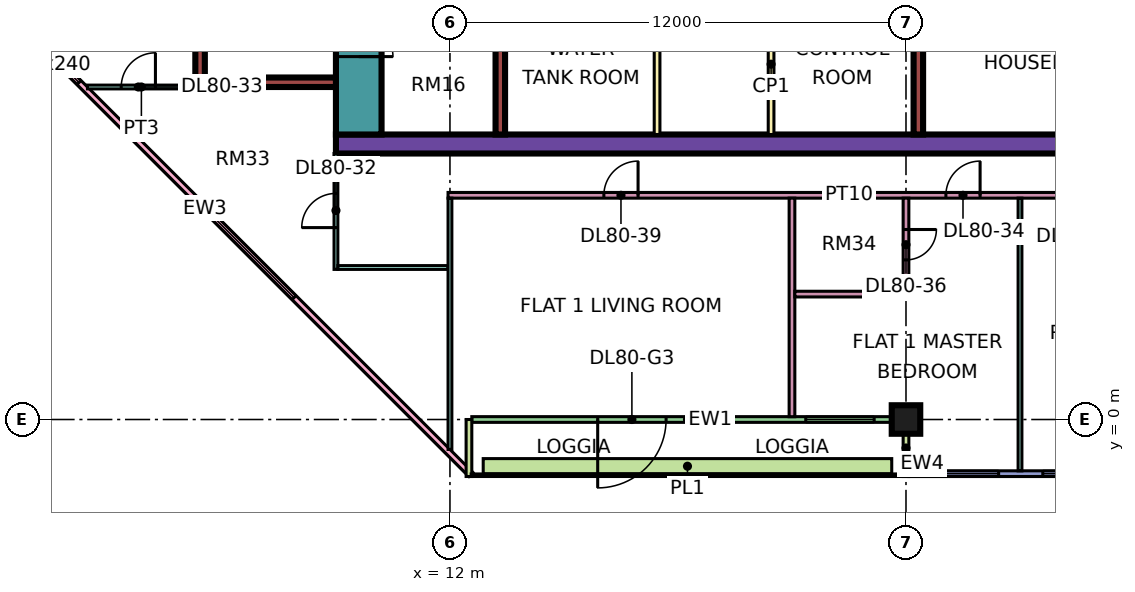
"""IFC4 building model, lengths in metres.
Left out: names, types, materials, properties, quantities, classifications, styles, units other than length and angle.
Written with IfcOpenShell. Run it as: python <this file> out.ifc"""

import sys

from ifc_helpers import new_model, si_unit, direction, frame, frame_2d, origin, origin_2d, place, context, subcontext, project, spatial, rectangle, extrude, element, fill, save


model = new_model("IFC4")
c1 = context("Model", 3, precision=1e-05, world=origin(), true_north=direction((0.0, 1.0)))
c2 = subcontext(c1, "Body", "Model", "MODEL_VIEW")
j1 = project(units=[si_unit("LENGTHUNIT", "METRE"), si_unit("PLANEANGLEUNIT", "RADIAN")], contexts=[c1])
p1 = place(None, origin())
s1 = spatial("IfcSite", under=j1, at=p1, CompositionType="ELEMENT")
p2 = place(p1, origin())
s2 = spatial("IfcBuilding", under=s1, at=p2, CompositionType="ELEMENT")
p3 = place(p2, frame((0.0, 0.0, 346.4)))
s3 = spatial("IfcBuildingStorey", under=s2, at=p3, CompositionType="ELEMENT", Elevation=346.4)
p4 = place(p3, frame((24.0, 0.0, 0.0), z_axis=(0.0, 0.0, 1.0), x_axis=(1.0, 0.0, 0.0)))
e1 = element("IfcColumn", 1, at=p4, inside=s3, PredefinedType="COLUMN", context=c2, shape_type="SweptSolid", body=[
    extrude(rectangle(XDim=0.75, YDim=0.75, at=origin_2d()), origin(), (0.0, 0.0, 1.0), 3.75),
])
p5 = place(p3, frame((9.0, 7.25, 0.0), z_axis=(0.0, 0.0, 1.0), x_axis=(1.0, 0.0, 0.0)))
e2 = element("IfcWall", 2, at=p5, inside=s3, PredefinedType="SHEAR", context=c2, shape_type="SweptSolid", body=[
    extrude(rectangle(XDim=25.0, YDim=0.5, at=frame_2d((12.5, 0.0))), origin(), (0.0, 0.0, 1.0), 3.75),
])
p6 = place(p3, frame((9.6, 7.5, 0.0), z_axis=(0.0, 0.0, 1.0), x_axis=(0.0, 1.0, 0.0)))
e3 = element("IfcWall", 3, at=p6, inside=s3, PredefinedType="SHEAR", context=c2, shape_type="SweptSolid", body=[
    extrude(rectangle(XDim=12.0, YDim=1.2, at=frame_2d((6.0, 0.0))), origin(), (0.0, 0.0, 1.0), 3.75),
])
p7 = place(p6, frame((4.375, 0.0, 0.0)))
e4 = element("IfcOpeningElement", 4, at=p7, cuts=e3, PredefinedType="OPENING", context=c2, shape_type="SweptSolid", body=[
    extrude(rectangle(XDim=1.1, YDim=2.2, at=frame_2d((0.55, 1.1))), frame((0.0, 0.61, 0.0), z_axis=(0.0, -1.0, 0.0), x_axis=(1.0, 0.0, 0.0)), (0.0, 0.0, 1.0), 1.22),
])
p8 = place(p6, frame((6.875, 0.0, 0.0)))
e5 = element("IfcOpeningElement", 5, at=p8, cuts=e3, PredefinedType="OPENING", context=c2, shape_type="SweptSolid", body=[
    extrude(rectangle(XDim=1.1, YDim=2.2, at=frame_2d((0.55, 1.1))), frame((0.0, 0.61, 0.0), z_axis=(0.0, -1.0, 0.0), x_axis=(1.0, 0.0, 0.0)), (0.0, 0.0, 1.0), 1.22),
])
p9 = place(p6, frame((9.85, 0.0, 0.0)))
e6 = element("IfcOpeningElement", 6, at=p9, cuts=e3, PredefinedType="OPENING", context=c2, shape_type="SweptSolid", body=[
    extrude(rectangle(XDim=1.1, YDim=2.2, at=frame_2d((0.55, 1.1))), frame((0.0, 0.61, 0.0), z_axis=(0.0, -1.0, 0.0), x_axis=(1.0, 0.0, 0.0)), (0.0, 0.0, 1.0), 1.22),
])
p10 = place(p6, frame((2.05, 0.0, 0.0)))
e7 = element("IfcOpeningElement", 7, at=p10, cuts=e3, PredefinedType="OPENING", context=c2, shape_type="SweptSolid", body=[
    extrude(rectangle(XDim=0.9, YDim=2.1, at=frame_2d((0.45, 1.05))), frame((0.0, 0.61, 0.0), z_axis=(0.0, -1.0, 0.0), x_axis=(1.0, 0.0, 0.0)), (0.0, 0.0, 1.0), 1.22),
])
p11 = place(p3, frame((13.325, 7.5, 0.0), z_axis=(0.0, 0.0, 1.0), x_axis=(0.0, 1.0, 0.0)))
e8 = element("IfcWall", 8, at=p11, inside=s3, PredefinedType="SHEAR", context=c2, shape_type="SweptSolid", body=[
    extrude(rectangle(XDim=12.0, YDim=0.25, at=frame_2d((6.0, 0.0))), origin(), (0.0, 0.0, 1.0), 3.75),
])
for number, where, z_axis, x_axis in (
    (9, (24.325, 7.5, 0.0), (0.0, 0.0, 1.0), (0.0, 1.0, 0.0)),
    (10, (5.3, 8.875, 0.0), (0.0, 0.0, 1.0), (1.0, 0.0, 0.0)),
):
    element("IfcWall", number, at=place(p3, frame(where, z_axis=z_axis, x_axis=x_axis)), inside=s3, PredefinedType="SHEAR", context=c2, shape_type="SweptSolid", body=[
        extrude(rectangle(XDim=3.7, YDim=0.25, at=frame_2d((1.85, 0.0))), origin(), (0.0, 0.0, 1.0), 3.75),
    ])
p12 = place(p3, frame((5.425, 9.0, 0.0), z_axis=(0.0, 0.0, 1.0), x_axis=(0.0, 1.0, 0.0)))
e11 = element("IfcWall", 11, at=p12, inside=s3, PredefinedType="SHEAR", context=c2, shape_type="SweptSolid", body=[
    extrude(rectangle(XDim=4.0, YDim=0.25, at=frame_2d((2.0, 0.0))), origin(), (0.0, 0.0, 1.0), 3.75),
])
p13 = place(p3, frame((-1.447, 12.553, 0.0), z_axis=(0.0, 0.0, 1.0), x_axis=(0.707106781187, -0.707106781187, 0.0)))
e12 = element("IfcWall", 12, at=p13, inside=s3, PredefinedType="SOLIDWALL", context=c2, shape_type="SweptSolid", body=[
    extrude(rectangle(XDim=19.799, YDim=0.15, at=frame_2d((9.899, 0.0))), origin(), (0.0, 0.0, 1.0), 3.35),
])
p14 = place(p13, frame((2.212, 0.0, 0.45)))
e13 = element("IfcOpeningElement", 13, at=p14, cuts=e12, PredefinedType="OPENING", context=c2, shape_type="SweptSolid", body=[
    extrude(rectangle(XDim=3.0, YDim=2.4, at=frame_2d((1.5, 1.2))), frame((0.0, 0.085, 0.0), z_axis=(0.0, -1.0, 0.0), x_axis=(1.0, 0.0, 0.0)), (0.0, 0.0, 1.0), 0.17),
])
p15 = place(p13, frame((10.216, 0.0, 0.45)))
e14 = element("IfcOpeningElement", 14, at=p15, cuts=e12, PredefinedType="OPENING", context=c2, shape_type="SweptSolid", body=[
    extrude(rectangle(XDim=3.0, YDim=2.4, at=frame_2d((1.5, 1.2))), frame((0.0, 0.085, 0.0), z_axis=(0.0, -1.0, 0.0), x_axis=(1.0, 0.0, 0.0)), (0.0, 0.0, 1.0), 0.17),
])
p16 = place(p3, frame((12.575, 0.0, 0.0), z_axis=(0.0, 0.0, 1.0), x_axis=(1.0, 0.0, 0.0)))
e15 = element("IfcWall", 15, at=p16, inside=s3, PredefinedType="SOLIDWALL", context=c2, shape_type="SweptSolid", body=[
    extrude(rectangle(XDim=11.35, YDim=0.15, at=frame_2d((5.675, 0.0))), origin(), (0.0, 0.0, 1.0), 3.35),
])
p17 = place(p16, frame((3.312, 0.0, 0.0)))
e16 = element("IfcOpeningElement", 16, at=p17, cuts=e15, PredefinedType="OPENING", context=c2, shape_type="SweptSolid", body=[
    extrude(rectangle(XDim=1.8, YDim=2.4, at=frame_2d((0.9, 1.2))), frame((0.0, 0.085, 0.0), z_axis=(0.0, -1.0, 0.0), x_axis=(1.0, 0.0, 0.0)), (0.0, 0.0, 1.0), 0.17),
])
p18 = place(p16, frame((8.788, 0.0, 0.45)))
e17 = element("IfcOpeningElement", 17, at=p18, cuts=e15, PredefinedType="OPENING", context=c2, shape_type="SweptSolid", body=[
    extrude(rectangle(XDim=1.8, YDim=2.4, at=frame_2d((0.9, 1.2))), frame((0.0, 0.085, 0.0), z_axis=(0.0, -1.0, 0.0), x_axis=(1.0, 0.0, 0.0)), (0.0, 0.0, 1.0), 0.17),
])
for number, where, z_axis, x_axis in (
    (18, (12.5, -1.5, 0.0), (0.0, 0.0, 1.0), (0.0, 1.0, 0.0)),
    (19, (24.0, -1.5, 0.0), (0.0, 0.0, 1.0), (0.0, 1.0, 0.0)),
):
    element("IfcWall", number, at=place(p3, frame(where, z_axis=z_axis, x_axis=x_axis)), inside=s3, PredefinedType="SOLIDWALL", context=c2, shape_type="SweptSolid", body=[
        extrude(rectangle(XDim=1.5, YDim=0.15, at=frame_2d((0.75, 0.0))), origin(), (0.0, 0.0, 1.0), 3.35),
    ])
p19 = place(p3, frame((24.075, -1.425, 0.0), z_axis=(0.0, 0.0, 1.0), x_axis=(1.0, 0.0, 0.0)))
e20 = element("IfcWall", 20, at=p19, inside=s3, PredefinedType="SOLIDWALL", context=c2, shape_type="SweptSolid", body=[
    extrude(rectangle(XDim=11.85, YDim=0.15, at=frame_2d((5.925, 0.0))), origin(), (0.0, 0.0, 1.0), 3.35),
])
p20 = place(p19, frame((0.562, 0.0, 0.45)))
e21 = element("IfcOpeningElement", 21, at=p20, cuts=e20, PredefinedType="OPENING", context=c2, shape_type="SweptSolid", body=[
    extrude(rectangle(XDim=1.8, YDim=2.4, at=frame_2d((0.9, 1.2))), frame((0.0, 0.085, 0.0), z_axis=(0.0, -1.0, 0.0), x_axis=(1.0, 0.0, 0.0)), (0.0, 0.0, 1.0), 0.17),
])
p21 = place(p19, frame((3.525, 0.0, 0.45)))
e22 = element("IfcOpeningElement", 22, at=p21, cuts=e20, PredefinedType="OPENING", context=c2, shape_type="SweptSolid", body=[
    extrude(rectangle(XDim=1.8, YDim=2.4, at=frame_2d((0.9, 1.2))), frame((0.0, 0.085, 0.0), z_axis=(0.0, -1.0, 0.0), x_axis=(1.0, 0.0, 0.0)), (0.0, 0.0, 1.0), 0.17),
])
p22 = place(p19, frame((6.525, 0.0, 0.45)))
e23 = element("IfcOpeningElement", 23, at=p22, cuts=e20, PredefinedType="OPENING", context=c2, shape_type="SweptSolid", body=[
    extrude(rectangle(XDim=1.8, YDim=2.4, at=frame_2d((0.9, 1.2))), frame((0.0, 0.085, 0.0), z_axis=(0.0, -1.0, 0.0), x_axis=(1.0, 0.0, 0.0)), (0.0, 0.0, 1.0), 0.17),
])
p23 = place(p19, frame((9.488, 0.0, 0.45)))
e24 = element("IfcOpeningElement", 24, at=p23, cuts=e20, PredefinedType="OPENING", context=c2, shape_type="SweptSolid", body=[
    extrude(rectangle(XDim=1.8, YDim=2.4, at=frame_2d((0.9, 1.2))), frame((0.0, 0.085, 0.0), z_axis=(0.0, -1.0, 0.0), x_axis=(1.0, 0.0, 0.0)), (0.0, 0.0, 1.0), 0.17),
])
p24 = place(p3, frame((12.875, -1.229, 0.0), z_axis=(0.0, 0.0, 1.0), x_axis=(1.0, 0.0, 0.0)))
e25 = element("IfcWall", 25, at=p24, inside=s3, PredefinedType="SOLIDWALL", context=c2, shape_type="SweptSolid", body=[
    extrude(rectangle(XDim=10.75, YDim=0.4, at=frame_2d((5.375, 0.0))), origin(), (0.0, 0.0, 1.0), 0.7),
])
for number, where, z_axis, x_axis in (
    (26, (17.45, 7.5, 0.0), (0.0, 0.0, 1.0), (0.0, 1.0, 0.0)),
    (27, (20.45, 7.5, 0.0), (0.0, 0.0, 1.0), (0.0, 1.0, 0.0)),
):
    element("IfcWall", number, at=place(p3, frame(where, z_axis=z_axis, x_axis=x_axis)), inside=s3, PredefinedType="PARTITIONING", context=c2, shape_type="SweptSolid", body=[
        extrude(rectangle(XDim=3.7, YDim=0.15, at=frame_2d((1.85, 0.0))), origin(), (0.0, 0.0, 1.0), 3.35),
    ])
p25 = place(p3, frame((2.461, 8.75, 0.0), z_axis=(0.0, 0.0, 1.0), x_axis=(1.0, 0.0, 0.0)))
e28 = element("IfcWall", 28, at=p25, inside=s3, PredefinedType="PARTITIONING", context=c2, shape_type="SweptSolid", body=[
    extrude(rectangle(XDim=2.839, YDim=0.1, at=frame_2d((1.419, 0.0))), origin(), (0.0, 0.0, 1.0), 3.35),
])
p26 = place(p25, frame((0.889, 0.0, 0.0)))
e29 = element("IfcOpeningElement", 29, at=p26, cuts=e28, PredefinedType="OPENING", context=c2, shape_type="SweptSolid", body=[
    extrude(rectangle(XDim=0.9, YDim=2.1, at=frame_2d((0.45, 1.05))), frame((0.0, 0.06, 0.0), z_axis=(0.0, -1.0, 0.0), x_axis=(1.0, 0.0, 0.0)), (0.0, 0.0, 1.0), 0.12),
])
p27 = place(p3, frame((9.0, 3.95, 0.0), z_axis=(0.0, 0.0, 1.0), x_axis=(0.0, 1.0, 0.0)))
e30 = element("IfcWall", 30, at=p27, inside=s3, PredefinedType="PARTITIONING", context=c2, shape_type="SweptSolid", body=[
    extrude(rectangle(XDim=3.05, YDim=0.1, at=frame_2d((1.525, 0.0))), origin(), (0.0, 0.0, 1.0), 3.35),
])
p28 = place(p27, frame((1.1, 0.0, 0.0)))
e31 = element("IfcOpeningElement", 31, at=p28, cuts=e30, PredefinedType="OPENING", context=c2, shape_type="SweptSolid", body=[
    extrude(rectangle(XDim=0.9, YDim=2.1, at=frame_2d((0.45, 1.05))), frame((0.0, 0.06, 0.0), z_axis=(0.0, -1.0, 0.0), x_axis=(1.0, 0.0, 0.0)), (0.0, 0.0, 1.0), 0.12),
])
p29 = place(p3, frame((9.05, 4.0, 0.0), z_axis=(0.0, 0.0, 1.0), x_axis=(1.0, 0.0, 0.0)))
e32 = element("IfcWall", 32, at=p29, inside=s3, PredefinedType="PARTITIONING", context=c2, shape_type="SweptSolid", body=[
    extrude(rectangle(XDim=2.9, YDim=0.1, at=frame_2d((1.45, 0.0))), origin(), (0.0, 0.0, 1.0), 3.35),
])
p30 = place(p3, frame((11.95, 5.9, 0.0), z_axis=(0.0, 0.0, 1.0), x_axis=(1.0, 0.0, 0.0)))
e33 = element("IfcWall", 33, at=p30, inside=s3, PredefinedType="PARTITIONING", context=c2, shape_type="SweptSolid", body=[
    extrude(rectangle(XDim=21.1, YDim=0.15, at=frame_2d((10.55, 0.0))), origin(), (0.0, 0.0, 1.0), 3.35),
])
p31 = place(p30, frame((16.1, 0.0, 0.0)))
e34 = element("IfcOpeningElement", 34, at=p31, cuts=e33, PredefinedType="OPENING", context=c2, shape_type="SweptSolid", body=[
    extrude(rectangle(XDim=0.9, YDim=2.1, at=frame_2d((0.45, 1.05))), frame((0.0, 0.085, 0.0), z_axis=(0.0, -1.0, 0.0), x_axis=(1.0, 0.0, 0.0)), (0.0, 0.0, 1.0), 0.17),
])
p32 = place(p30, frame((13.1, 0.0, 0.0)))
e35 = element("IfcOpeningElement", 35, at=p32, cuts=e33, PredefinedType="OPENING", context=c2, shape_type="SweptSolid", body=[
    extrude(rectangle(XDim=0.9, YDim=2.1, at=frame_2d((0.45, 1.05))), frame((0.0, 0.085, 0.0), z_axis=(0.0, -1.0, 0.0), x_axis=(1.0, 0.0, 0.0)), (0.0, 0.0, 1.0), 0.17),
])
p33 = place(p30, frame((4.1, 0.0, 0.0)))
e36 = element("IfcOpeningElement", 36, at=p33, cuts=e33, PredefinedType="OPENING", context=c2, shape_type="SweptSolid", body=[
    extrude(rectangle(XDim=0.9, YDim=2.1, at=frame_2d((0.45, 1.05))), frame((0.0, 0.085, 0.0), z_axis=(0.0, -1.0, 0.0), x_axis=(1.0, 0.0, 0.0)), (0.0, 0.0, 1.0), 0.17),
])
p34 = place(p3, frame((12.0, -0.788, 0.0), z_axis=(0.0, 0.0, 1.0), x_axis=(0.0, 1.0, 0.0)))
e37 = element("IfcWall", 37, at=p34, inside=s3, PredefinedType="PARTITIONING", context=c2, shape_type="SweptSolid", body=[
    extrude(rectangle(XDim=6.613, YDim=0.1, at=frame_2d((3.306, 0.0))), origin(), (0.0, 0.0, 1.0), 3.35),
])
p35 = place(p3, frame((21.0, 0.074, 0.0), z_axis=(0.0, 0.0, 1.0), x_axis=(0.0, 1.0, 0.0)))
e38 = element("IfcWall", 38, at=p35, inside=s3, PredefinedType="PARTITIONING", context=c2, shape_type="SweptSolid", body=[
    extrude(rectangle(XDim=5.751, YDim=0.15, at=frame_2d((2.875, 0.0))), origin(), (0.0, 0.0, 1.0), 3.35),
])
p36 = place(p3, frame((21.075, 3.3, 0.0), z_axis=(0.0, 0.0, 1.0), x_axis=(1.0, 0.0, 0.0)))
e39 = element("IfcWall", 39, at=p36, inside=s3, PredefinedType="PARTITIONING", context=c2, shape_type="SweptSolid", body=[
    extrude(rectangle(XDim=3.0, YDim=0.15, at=frame_2d((1.5, 0.0))), origin(), (0.0, 0.0, 1.0), 3.35),
])
p37 = place(p3, frame((24.0, 3.375, 0.0), z_axis=(0.0, 0.0, 1.0), x_axis=(0.0, 1.0, 0.0)))
e40 = element("IfcWall", 40, at=p37, inside=s3, PredefinedType="PARTITIONING", context=c2, shape_type="SweptSolid", body=[
    extrude(rectangle(XDim=2.45, YDim=0.15, at=frame_2d((1.225, 0.0))), origin(), (0.0, 0.0, 1.0), 3.35),
])
p38 = place(p37, frame((0.825, 0.0, 0.0)))
e41 = element("IfcOpeningElement", 41, at=p38, cuts=e40, PredefinedType="OPENING", context=c2, shape_type="SweptSolid", body=[
    extrude(rectangle(XDim=0.8, YDim=2.1, at=frame_2d((0.4, 1.05))), frame((0.0, 0.085, 0.0), z_axis=(0.0, -1.0, 0.0), x_axis=(1.0, 0.0, 0.0)), (0.0, 0.0, 1.0), 0.17),
])
p39 = place(p3, frame((27.0, -1.351, 0.0), z_axis=(0.0, 0.0, 1.0), x_axis=(0.0, 1.0, 0.0)))
e42 = element("IfcWall", 42, at=p39, inside=s3, PredefinedType="PARTITIONING", context=c2, shape_type="SweptSolid", body=[
    extrude(rectangle(XDim=7.176, YDim=0.1, at=frame_2d((3.588, 0.0))), origin(), (0.0, 0.0, 1.0), 3.35),
])
p40 = place(p14, origin())
e43 = element("IfcWindow", 43, at=p40, inside=s3, PartitioningType="SINGLE_PANEL", PredefinedType="WINDOW", context=c2, shape_type="SweptSolid", body=[
    extrude(rectangle(XDim=3.0, YDim=2.4, at=frame_2d((1.5, 1.2))), frame((0.0, 0.03, 0.0), z_axis=(0.0, -1.0, 0.0), x_axis=(1.0, 0.0, 0.0)), (0.0, 0.0, 1.0), 0.06),
])
fill(e13, e43)
p41 = place(p15, origin())
e44 = element("IfcWindow", 44, at=p41, inside=s3, PartitioningType="SINGLE_PANEL", PredefinedType="WINDOW", context=c2, shape_type="SweptSolid", body=[
    extrude(rectangle(XDim=3.0, YDim=2.4, at=frame_2d((1.5, 1.2))), frame((0.0, 0.03, 0.0), z_axis=(0.0, -1.0, 0.0), x_axis=(1.0, 0.0, 0.0)), (0.0, 0.0, 1.0), 0.06),
])
fill(e14, e44)
p42 = place(p17, frame((1.8, 0.0, 0.0), z_axis=(0.0, 0.0, 1.0), x_axis=(-1.0, 0.0, 0.0)))
e45 = element("IfcDoor", 45, at=p42, inside=s3, OperationType="DOUBLE_DOOR_SINGLE_SWING", PredefinedType="DOOR", context=c2, shape_type="SweptSolid", body=[
    extrude(rectangle(XDim=1.8, YDim=2.4, at=frame_2d((0.9, 1.2))), frame((0.0, 0.025, 0.0), z_axis=(0.0, -1.0, 0.0), x_axis=(1.0, 0.0, 0.0)), (0.0, 0.0, 1.0), 0.05),
])
fill(e16, e45)
p43 = place(p18, origin())
e46 = element("IfcWindow", 46, at=p43, inside=s3, PartitioningType="SINGLE_PANEL", PredefinedType="WINDOW", context=c2, shape_type="SweptSolid", body=[
    extrude(rectangle(XDim=1.8, YDim=2.4, at=frame_2d((0.9, 1.2))), frame((0.0, 0.03, 0.0), z_axis=(0.0, -1.0, 0.0), x_axis=(1.0, 0.0, 0.0)), (0.0, 0.0, 1.0), 0.06),
])
fill(e17, e46)
p44 = place(p20, origin())
e47 = element("IfcWindow", 47, at=p44, inside=s3, PartitioningType="SINGLE_PANEL", PredefinedType="WINDOW", context=c2, shape_type="SweptSolid", body=[
    extrude(rectangle(XDim=1.8, YDim=2.4, at=frame_2d((0.9, 1.2))), frame((0.0, 0.03, 0.0), z_axis=(0.0, -1.0, 0.0), x_axis=(1.0, 0.0, 0.0)), (0.0, 0.0, 1.0), 0.06),
])
fill(e21, e47)
p45 = place(p21, origin())
e48 = element("IfcWindow", 48, at=p45, inside=s3, PartitioningType="SINGLE_PANEL", PredefinedType="WINDOW", context=c2, shape_type="SweptSolid", body=[
    extrude(rectangle(XDim=1.8, YDim=2.4, at=frame_2d((0.9, 1.2))), frame((0.0, 0.03, 0.0), z_axis=(0.0, -1.0, 0.0), x_axis=(1.0, 0.0, 0.0)), (0.0, 0.0, 1.0), 0.06),
])
fill(e22, e48)
p46 = place(p10, frame((0.9, 0.0, 0.0), z_axis=(0.0, 0.0, 1.0), x_axis=(-1.0, 0.0, 0.0)))
e49 = element("IfcDoor", 49, at=p46, inside=s3, OperationType="SINGLE_SWING_LEFT", PredefinedType="DOOR", context=c2, shape_type="SweptSolid", body=[
    extrude(rectangle(XDim=0.9, YDim=2.1, at=frame_2d((0.45, 1.05))), frame((0.0, 0.025, 0.0), z_axis=(0.0, -1.0, 0.0), x_axis=(1.0, 0.0, 0.0)), (0.0, 0.0, 1.0), 0.05),
])
fill(e7, e49)
p47 = place(p28, origin())
e50 = element("IfcDoor", 50, at=p47, inside=s3, OperationType="SINGLE_SWING_LEFT", PredefinedType="DOOR", context=c2, shape_type="SweptSolid", body=[
    extrude(rectangle(XDim=0.9, YDim=2.1, at=frame_2d((0.45, 1.05))), frame((0.0, 0.025, 0.0), z_axis=(0.0, -1.0, 0.0), x_axis=(1.0, 0.0, 0.0)), (0.0, 0.0, 1.0), 0.05),
])
fill(e31, e50)
p48 = place(p26, frame((0.9, 0.0, 0.0), z_axis=(0.0, 0.0, 1.0), x_axis=(-1.0, 0.0, 0.0)))
e51 = element("IfcDoor", 51, at=p48, inside=s3, OperationType="SINGLE_SWING_RIGHT", PredefinedType="DOOR", context=c2, shape_type="SweptSolid", body=[
    extrude(rectangle(XDim=0.9, YDim=2.1, at=frame_2d((0.45, 1.05))), frame((0.0, 0.025, 0.0), z_axis=(0.0, -1.0, 0.0), x_axis=(1.0, 0.0, 0.0)), (0.0, 0.0, 1.0), 0.05),
])
fill(e29, e51)
p49 = place(p32, frame((0.9, 0.0, 0.0), z_axis=(0.0, 0.0, 1.0), x_axis=(-1.0, 0.0, 0.0)))
e52 = element("IfcDoor", 52, at=p49, inside=s3, OperationType="SINGLE_SWING_RIGHT", PredefinedType="DOOR", context=c2, shape_type="SweptSolid", body=[
    extrude(rectangle(XDim=0.9, YDim=2.1, at=frame_2d((0.45, 1.05))), frame((0.0, 0.025, 0.0), z_axis=(0.0, -1.0, 0.0), x_axis=(1.0, 0.0, 0.0)), (0.0, 0.0, 1.0), 0.05),
])
fill(e35, e52)
p50 = place(p38, origin())
e53 = element("IfcDoor", 53, at=p50, inside=s3, OperationType="SINGLE_SWING_RIGHT", PredefinedType="DOOR", context=c2, shape_type="SweptSolid", body=[
    extrude(rectangle(XDim=0.8, YDim=2.1, at=frame_2d((0.4, 1.05))), frame((0.0, 0.025, 0.0), z_axis=(0.0, -1.0, 0.0), x_axis=(1.0, 0.0, 0.0)), (0.0, 0.0, 1.0), 0.05),
])
fill(e41, e53)
p51 = place(p33, frame((0.9, 0.0, 0.0), z_axis=(0.0, 0.0, 1.0), x_axis=(-1.0, 0.0, 0.0)))
e54 = element("IfcDoor", 54, at=p51, inside=s3, OperationType="SINGLE_SWING_RIGHT", PredefinedType="DOOR", context=c2, shape_type="SweptSolid", body=[
    extrude(rectangle(XDim=0.9, YDim=2.1, at=frame_2d((0.45, 1.05))), frame((0.0, 0.025, 0.0), z_axis=(0.0, -1.0, 0.0), x_axis=(1.0, 0.0, 0.0)), (0.0, 0.0, 1.0), 0.05),
])
fill(e36, e54)
save(model, sys.argv[1])
